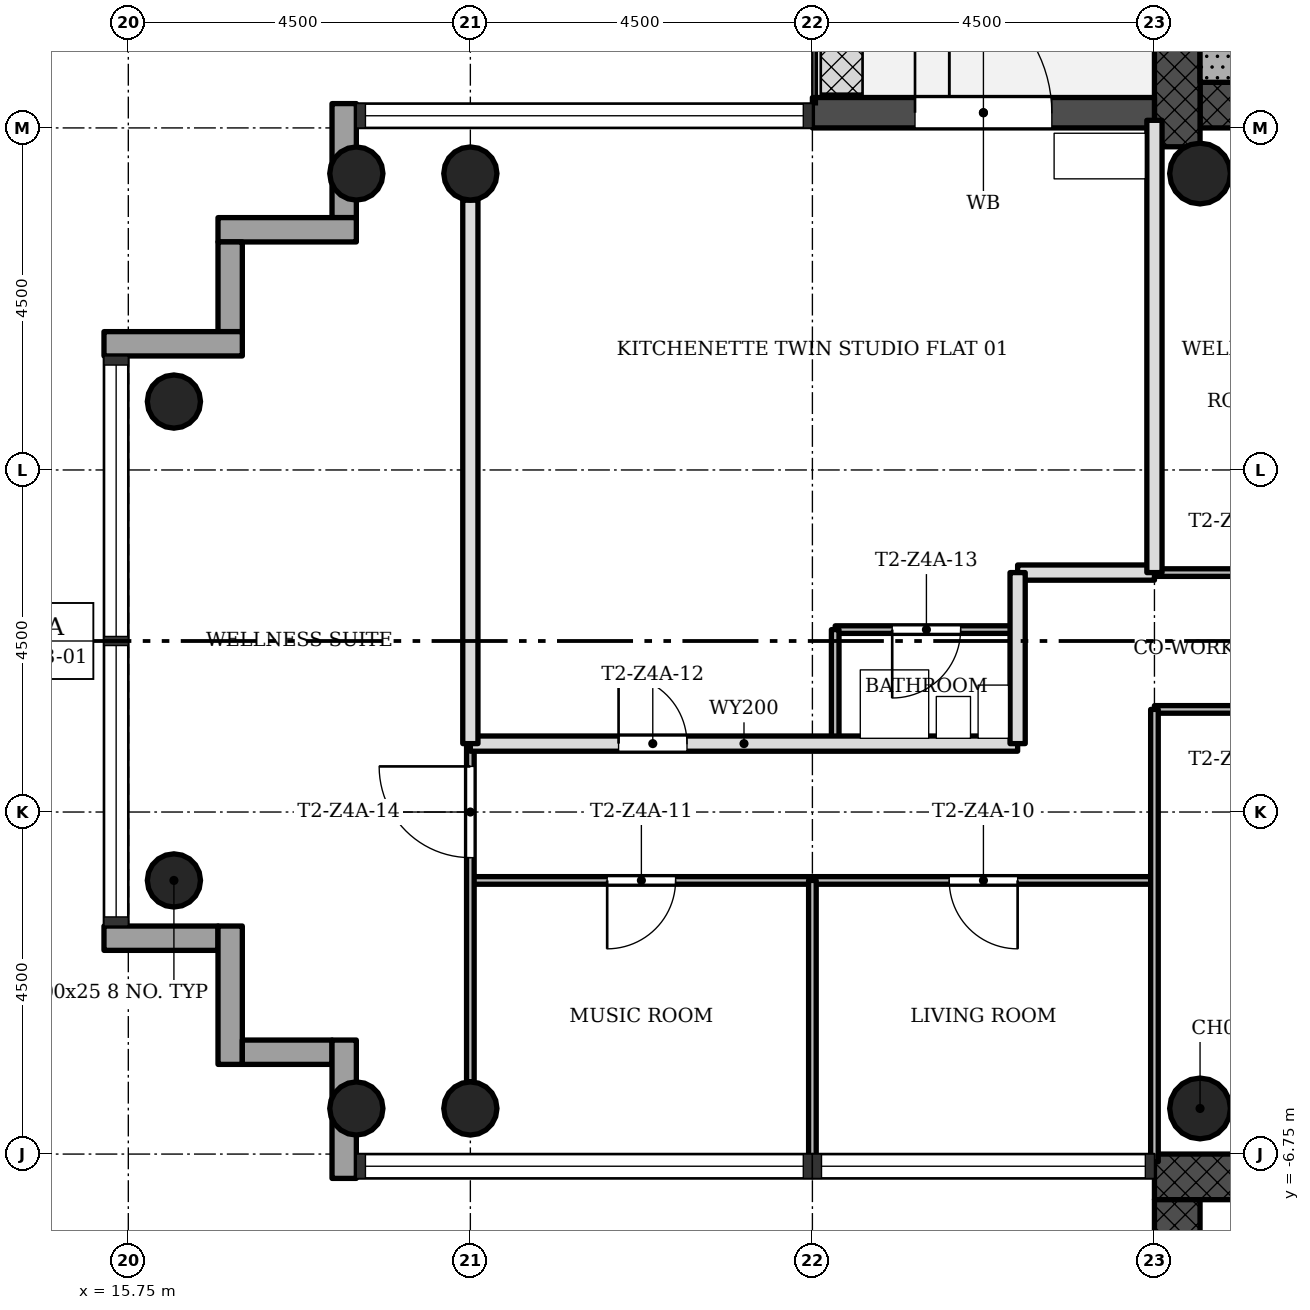
"""IFC4 building model, lengths in metres.
Left out: names, types, materials, properties, quantities, classifications, styles, units other than length and angle.
Written with IfcOpenShell. Run it as: python <this file> out.ifc"""

import sys

from ifc_helpers import new_model, si_unit, direction, frame, frame_2d, origin, origin_2d, place, context, subcontext, project, spatial, rectangle, hollow_circle, extrude, element, fill, save


model = new_model("IFC4")
c1 = context("Model", 3, precision=1e-05, world=origin(), true_north=direction((0.0, 1.0)))
c2 = subcontext(c1, "Body", "Model", "MODEL_VIEW")
j1 = project(units=[si_unit("LENGTHUNIT", "METRE"), si_unit("PLANEANGLEUNIT", "RADIAN")], contexts=[c1])
p1 = place(None, origin())
s1 = spatial("IfcSite", under=j1, at=p1, CompositionType="ELEMENT")
p2 = place(p1, origin())
s2 = spatial("IfcBuilding", under=s1, at=p2, CompositionType="ELEMENT")
p3 = place(p2, frame((0.0, 0.0, 226.6)))
s3 = spatial("IfcBuildingStorey", under=s2, at=p3, CompositionType="ELEMENT", Elevation=226.6)
p4 = place(p3, frame((29.85, 7.05, 0.0), z_axis=(0.0, 0.0, 1.0), x_axis=(1.0, 0.0, 0.0)))
e1 = element("IfcWall", 1, at=p4, inside=s3, PredefinedType="SHEAR", context=c2, shape_type="SweptSolid", body=[
    extrude(rectangle(XDim=12.9, YDim=0.6, at=frame_2d((6.45, 0.0))), origin(), (0.0, 0.0, 1.0), 3.4),
])
p5 = place(p4, frame((5.25, 0.0, 0.0)))
e2 = element("IfcOpeningElement", 2, at=p5, cuts=e1, PredefinedType="OPENING", context=c2, shape_type="SweptSolid", body=[
    extrude(rectangle(XDim=1.8, YDim=2.1, at=frame_2d((0.9, 1.05))), frame((0.0, 0.31, 0.0), z_axis=(0.0, -1.0, 0.0), x_axis=(1.0, 0.0, 0.0)), (0.0, 0.0, 1.0), 0.62),
])
p6 = place(p3, frame((29.55, 15.15, 0.0), z_axis=(0.0, 0.0, 1.0), x_axis=(0.0, -1.0, 0.0)))
e3 = element("IfcWall", 3, at=p6, inside=s3, PredefinedType="SHEAR", context=c2, shape_type="SweptSolid", body=[
    extrude(rectangle(XDim=8.648, YDim=0.6, at=frame_2d((4.324, 0.0))), origin(), (0.0, 0.0, 1.0), 3.4),
])
p7 = place(p3, frame((42.15, -7.05, 0.0), z_axis=(0.0, 0.0, 1.0), x_axis=(-1.0, 0.0, 0.0)))
e4 = element("IfcWall", 4, at=p7, inside=s3, PredefinedType="SHEAR", context=c2, shape_type="SweptSolid", body=[
    extrude(rectangle(XDim=12.9, YDim=0.6, at=frame_2d((6.45, 0.0))), origin(), (0.0, 0.0, 1.0), 3.4),
])
p8 = place(p7, frame((5.25, 0.0, 0.0)))
e5 = element("IfcOpeningElement", 5, at=p8, cuts=e4, PredefinedType="OPENING", context=c2, shape_type="SweptSolid", body=[
    extrude(rectangle(XDim=1.8, YDim=2.1, at=frame_2d((0.9, 1.05))), frame((0.0, 0.31, 0.0), z_axis=(0.0, -1.0, 0.0), x_axis=(1.0, 0.0, 0.0)), (0.0, 0.0, 1.0), 0.62),
])
p9 = place(p3, frame((29.55, -7.35, 0.0), z_axis=(0.0, 0.0, 1.0), x_axis=(0.0, -1.0, 0.0)))
e6 = element("IfcWall", 6, at=p9, inside=s3, PredefinedType="SHEAR", context=c2, shape_type="SweptSolid", body=[
    extrude(rectangle(XDim=8.4, YDim=0.6, at=frame_2d((4.2, 0.0))), origin(), (0.0, 0.0, 1.0), 3.4),
])
for number, where, z_axis, x_axis in (
    (7, (20.25, 6.15, 0.0), (0.0, 0.0, 1.0), (1.0, 0.0, 0.0)),
    (8, (20.25, -6.15, 0.0), (0.0, 0.0, 1.0), (1.0, 0.0, 0.0)),
    (9, (18.75, 6.15, 0.0), (0.0, 0.0, 1.0), (1.0, 0.0, 0.0)),
    (10, (18.75, -6.15, 0.0), (0.0, 0.0, 1.0), (1.0, 0.0, 0.0)),
    (11, (16.35, 3.15, 0.0), (0.0, 0.0, 1.0), (1.0, 0.0, 0.0)),
    (12, (16.35, -3.15, 0.0), (0.0, 0.0, 1.0), (1.0, 0.0, 0.0)),
):
    element("IfcColumn", number, at=place(p3, frame(where, z_axis=z_axis, x_axis=x_axis)), inside=s3, PredefinedType="COLUMN", context=c2, shape_type="SweptSolid", body=[
        extrude(hollow_circle(Radius=0.35, WallThickness=0.025, at=origin_2d()), origin(), (0.0, 0.0, 1.0), 3.4),
    ])
for number, where, z_axis, x_axis in (
    (13, (29.85, 6.15, 0.0), (0.0, 0.0, 1.0), (1.0, 0.0, 0.0)),
    (14, (29.85, -6.15, 0.0), (0.0, 0.0, 1.0), (1.0, 0.0, 0.0)),
):
    element("IfcColumn", number, at=place(p3, frame(where, z_axis=z_axis, x_axis=x_axis)), inside=s3, PredefinedType="COLUMN", context=c2, shape_type="SweptSolid", body=[
        extrude(hollow_circle(Radius=0.4, WallThickness=0.028, at=origin_2d()), origin(), (0.0, 0.0, 1.0), 3.4),
    ])
p10 = place(p3, frame((29.25, 6.95, -0.02), z_axis=(0.0, 0.0, 1.0), x_axis=(-1.0, 0.0, 0.0)))
e15 = element("IfcWall", 15, at=p10, inside=s3, PredefinedType="STANDARD", context=c2, shape_type="SweptSolid", body=[
    extrude(rectangle(XDim=4.5, YDim=0.4, at=frame_2d((2.25, 0.0))), origin(), (0.0, 0.0, 1.0), 3.12),
])
p11 = place(p10, frame((1.35, 0.0, 0.02)))
e16 = element("IfcOpeningElement", 16, at=p11, cuts=e15, PredefinedType="OPENING", context=c2, shape_type="SweptSolid", body=[
    extrude(rectangle(XDim=1.8, YDim=2.1, at=frame_2d((0.9, 1.05))), frame((0.0, 0.21, 0.0), z_axis=(0.0, -1.0, 0.0), x_axis=(1.0, 0.0, 0.0)), (0.0, 0.0, 1.0), 0.42),
])
p12 = place(p3, frame((18.59, 7.07, -0.3), z_axis=(0.0, 0.0, 1.0), x_axis=(0.0, -1.0, 0.0)))
e17 = element("IfcWall", 17, at=p12, inside=s3, PredefinedType="STANDARD", context=c2, shape_type="SweptSolid", body=[
    extrude(rectangle(XDim=1.5, YDim=0.32, at=frame_2d((0.75, 0.0))), origin(), (0.0, 0.0, 1.0), 3.4),
])
p13 = place(p3, frame((18.75, 5.41, -0.3), z_axis=(0.0, 0.0, 1.0), x_axis=(-1.0, 0.0, 0.0)))
e18 = element("IfcWall", 18, at=p13, inside=s3, PredefinedType="STANDARD", context=c2, shape_type="SweptSolid", body=[
    extrude(rectangle(XDim=1.82, YDim=0.32, at=frame_2d((0.91, 0.0))), origin(), (0.0, 0.0, 1.0), 3.4),
])
p14 = place(p3, frame((17.09, 5.25, -0.3), z_axis=(0.0, 0.0, 1.0), x_axis=(0.0, -1.0, 0.0)))
e19 = element("IfcWall", 19, at=p14, inside=s3, PredefinedType="STANDARD", context=c2, shape_type="SweptSolid", body=[
    extrude(rectangle(XDim=1.18, YDim=0.32, at=frame_2d((0.59, 0.0))), origin(), (0.0, 0.0, 1.0), 3.4),
])
p15 = place(p3, frame((17.25, 3.91, -0.3), z_axis=(0.0, 0.0, 1.0), x_axis=(-1.0, 0.0, 0.0)))
e20 = element("IfcWall", 20, at=p15, inside=s3, PredefinedType="STANDARD", context=c2, shape_type="SweptSolid", body=[
    extrude(rectangle(XDim=1.82, YDim=0.32, at=frame_2d((0.91, 0.0))), origin(), (0.0, 0.0, 1.0), 3.4),
])
p16 = place(p3, frame((15.43, -3.91, -0.3), z_axis=(0.0, 0.0, 1.0), x_axis=(1.0, 0.0, 0.0)))
e21 = element("IfcWall", 21, at=p16, inside=s3, PredefinedType="STANDARD", context=c2, shape_type="SweptSolid", body=[
    extrude(rectangle(XDim=1.5, YDim=0.32, at=frame_2d((0.75, 0.0))), origin(), (0.0, 0.0, 1.0), 3.4),
])
p17 = place(p3, frame((17.09, -3.75, -0.3), z_axis=(0.0, 0.0, 1.0), x_axis=(0.0, -1.0, 0.0)))
e22 = element("IfcWall", 22, at=p17, inside=s3, PredefinedType="STANDARD", context=c2, shape_type="SweptSolid", body=[
    extrude(rectangle(XDim=1.82, YDim=0.32, at=frame_2d((0.91, 0.0))), origin(), (0.0, 0.0, 1.0), 3.4),
])
p18 = place(p3, frame((17.25, -5.41, -0.3), z_axis=(0.0, 0.0, 1.0), x_axis=(1.0, 0.0, 0.0)))
e23 = element("IfcWall", 23, at=p18, inside=s3, PredefinedType="STANDARD", context=c2, shape_type="SweptSolid", body=[
    extrude(rectangle(XDim=1.18, YDim=0.32, at=frame_2d((0.59, 0.0))), origin(), (0.0, 0.0, 1.0), 3.4),
])
p19 = place(p3, frame((18.59, -5.25, -0.3), z_axis=(0.0, 0.0, 1.0), x_axis=(0.0, -1.0, 0.0)))
e24 = element("IfcWall", 24, at=p19, inside=s3, PredefinedType="STANDARD", context=c2, shape_type="SweptSolid", body=[
    extrude(rectangle(XDim=1.82, YDim=0.32, at=frame_2d((0.91, 0.0))), origin(), (0.0, 0.0, 1.0), 3.4),
])
p20 = place(p3, frame((29.25, -3.15, 0.0), z_axis=(0.0, 0.0, 1.0), x_axis=(-1.0, 0.0, 0.0)))
e25 = element("IfcWall", 25, at=p20, inside=s3, PredefinedType="PARTITIONING", context=c2, shape_type="SweptSolid", body=[
    extrude(rectangle(XDim=9.0, YDim=0.1, at=frame_2d((4.5, 0.0))), origin(), (0.0, 0.0, 1.0), 3.0),
])
p21 = place(p20, frame((1.8, 0.0, 0.0)))
e26 = element("IfcOpeningElement", 26, at=p21, cuts=e25, PredefinedType="OPENING", context=c2, shape_type="SweptSolid", body=[
    extrude(rectangle(XDim=0.9, YDim=2.1, at=frame_2d((0.45, 1.05))), frame((0.0, 0.06, 0.0), z_axis=(0.0, -1.0, 0.0), x_axis=(1.0, 0.0, 0.0)), (0.0, 0.0, 1.0), 0.12),
])
p22 = place(p20, frame((6.3, 0.0, 0.0)))
e27 = element("IfcOpeningElement", 27, at=p22, cuts=e25, PredefinedType="OPENING", context=c2, shape_type="SweptSolid", body=[
    extrude(rectangle(XDim=0.9, YDim=2.1, at=frame_2d((0.45, 1.05))), frame((0.0, 0.06, 0.0), z_axis=(0.0, -1.0, 0.0), x_axis=(1.0, 0.0, 0.0)), (0.0, 0.0, 1.0), 0.12),
])
p23 = place(p3, frame((27.45, -1.35, 0.0), z_axis=(0.0, 0.0, 1.0), x_axis=(-1.0, 0.0, 0.0)))
e28 = element("IfcWall", 28, at=p23, inside=s3, PredefinedType="SOLIDWALL", context=c2, shape_type="SweptSolid", body=[
    extrude(rectangle(XDim=7.2, YDim=0.2, at=frame_2d((3.6, 0.0))), origin(), (0.0, 0.0, 1.0), 3.0),
])
p24 = place(p23, frame((4.35, 0.0, 0.0)))
e29 = element("IfcOpeningElement", 29, at=p24, cuts=e28, PredefinedType="OPENING", context=c2, shape_type="SweptSolid", body=[
    extrude(rectangle(XDim=0.9, YDim=2.1, at=frame_2d((0.45, 1.05))), frame((0.0, 0.11, 0.0), z_axis=(0.0, -1.0, 0.0), x_axis=(1.0, 0.0, 0.0)), (0.0, 0.0, 1.0), 0.22),
])
p25 = place(p3, frame((31.5, -0.9, 0.0), z_axis=(0.0, 0.0, 1.0), x_axis=(-1.0, 0.0, 0.0)))
e30 = element("IfcWall", 30, at=p25, inside=s3, PredefinedType="PARTITIONING", context=c2, shape_type="SweptSolid", body=[
    extrude(rectangle(XDim=2.25, YDim=0.1, at=frame_2d((1.125, 0.0))), origin(), (0.0, 0.0, 1.0), 3.0),
])
p26 = place(p3, frame((27.45, 0.15, 0.0), z_axis=(0.0, 0.0, 1.0), x_axis=(-1.0, 0.0, 0.0)))
e31 = element("IfcWall", 31, at=p26, inside=s3, PredefinedType="PARTITIONING", context=c2, shape_type="SweptSolid", body=[
    extrude(rectangle(XDim=2.4, YDim=0.1, at=frame_2d((1.2, 0.0))), origin(), (0.0, 0.0, 1.0), 3.0),
])
p27 = place(p26, frame((0.75, 0.0, 0.0)))
e32 = element("IfcOpeningElement", 32, at=p27, cuts=e31, PredefinedType="OPENING", context=c2, shape_type="SweptSolid", body=[
    extrude(rectangle(XDim=0.9, YDim=2.1, at=frame_2d((0.45, 1.05))), frame((0.0, 0.06, 0.0), z_axis=(0.0, -1.0, 0.0), x_axis=(1.0, 0.0, 0.0)), (0.0, 0.0, 1.0), 0.12),
])
p28 = place(p3, frame((31.5, 0.9, 0.0), z_axis=(0.0, 0.0, 1.0), x_axis=(-1.0, 0.0, 0.0)))
e33 = element("IfcWall", 33, at=p28, inside=s3, PredefinedType="PARTITIONING", context=c2, shape_type="SweptSolid", body=[
    extrude(rectangle(XDim=2.25, YDim=0.1, at=frame_2d((1.125, 0.0))), origin(), (0.0, 0.0, 1.0), 3.0),
])
p29 = place(p3, frame((29.25, 0.9, 0.0), z_axis=(0.0, 0.0, 1.0), x_axis=(-1.0, 0.0, 0.0)))
e34 = element("IfcWall", 34, at=p29, inside=s3, PredefinedType="SOLIDWALL", context=c2, shape_type="SweptSolid", body=[
    extrude(rectangle(XDim=1.8, YDim=0.2, at=frame_2d((0.9, 0.0))), origin(), (0.0, 0.0, 1.0), 3.0),
])
p30 = place(p3, frame((29.25, -6.85, 0.0), z_axis=(0.0, 0.0, 1.0), x_axis=(0.0, 1.0, 0.0)))
e35 = element("IfcWall", 35, at=p30, inside=s3, PredefinedType="PARTITIONING", context=c2, shape_type="SweptSolid", body=[
    extrude(rectangle(XDim=5.95, YDim=0.1, at=frame_2d((2.975, 0.0))), origin(), (0.0, 0.0, 1.0), 3.0),
])
p31 = place(p3, frame((29.25, 0.9, 0.0), z_axis=(0.0, 0.0, 1.0), x_axis=(0.0, 1.0, 0.0)))
e36 = element("IfcWall", 36, at=p31, inside=s3, PredefinedType="SOLIDWALL", context=c2, shape_type="SweptSolid", body=[
    extrude(rectangle(XDim=5.95, YDim=0.2, at=frame_2d((2.975, 0.0))), origin(), (0.0, 0.0, 1.0), 3.0),
])
p32 = place(p3, frame((27.45, -1.35, 0.0), z_axis=(0.0, 0.0, 1.0), x_axis=(0.0, 1.0, 0.0)))
e37 = element("IfcWall", 37, at=p32, inside=s3, PredefinedType="SOLIDWALL", context=c2, shape_type="SweptSolid", body=[
    extrude(rectangle(XDim=2.25, YDim=0.2, at=frame_2d((1.125, 0.0))), origin(), (0.0, 0.0, 1.0), 3.0),
])
p33 = place(p3, frame((25.05, -1.35, 0.0), z_axis=(0.0, 0.0, 1.0), x_axis=(0.0, 1.0, 0.0)))
e38 = element("IfcWall", 38, at=p33, inside=s3, PredefinedType="PARTITIONING", context=c2, shape_type="SweptSolid", body=[
    extrude(rectangle(XDim=1.5, YDim=0.1, at=frame_2d((0.75, 0.0))), origin(), (0.0, 0.0, 1.0), 3.0),
])
p34 = place(p3, frame((24.75, -6.85, 0.0), z_axis=(0.0, 0.0, 1.0), x_axis=(0.0, 1.0, 0.0)))
e39 = element("IfcWall", 39, at=p34, inside=s3, PredefinedType="PARTITIONING", context=c2, shape_type="SweptSolid", body=[
    extrude(rectangle(XDim=3.7, YDim=0.1, at=frame_2d((1.85, 0.0))), origin(), (0.0, 0.0, 1.0), 3.0),
])
p35 = place(p3, frame((20.25, -5.8, 0.0), z_axis=(0.0, 0.0, 1.0), x_axis=(0.0, 1.0, 0.0)))
e40 = element("IfcWall", 40, at=p35, inside=s3, PredefinedType="PARTITIONING", context=c2, shape_type="SweptSolid", body=[
    extrude(rectangle(XDim=4.45, YDim=0.1, at=frame_2d((2.225, 0.0))), origin(), (0.0, 0.0, 1.0), 3.0),
])
p36 = place(p35, frame((2.95, 0.0, 0.0)))
e41 = element("IfcOpeningElement", 41, at=p36, cuts=e40, PredefinedType="OPENING", context=c2, shape_type="SweptSolid", body=[
    extrude(rectangle(XDim=1.2, YDim=2.1, at=frame_2d((0.6, 1.05))), frame((0.0, 0.06, 0.0), z_axis=(0.0, -1.0, 0.0), x_axis=(1.0, 0.0, 0.0)), (0.0, 0.0, 1.0), 0.12),
])
p37 = place(p3, frame((20.25, -1.35, 0.0), z_axis=(0.0, 0.0, 1.0), x_axis=(0.0, 1.0, 0.0)))
e42 = element("IfcWall", 42, at=p37, inside=s3, PredefinedType="SOLIDWALL", context=c2, shape_type="SweptSolid", body=[
    extrude(rectangle(XDim=7.15, YDim=0.2, at=frame_2d((3.575, 0.0))), origin(), (0.0, 0.0, 1.0), 3.0),
])
p38 = place(p3, frame((34.15, 7.65, 0.0), z_axis=(0.0, 0.0, 1.0), x_axis=(-1.0, 0.0, 0.0)))
e43 = element("IfcWall", 43, at=p38, inside=s3, PredefinedType="SHEAR", context=c2, shape_type="SweptSolid", body=[
    extrude(rectangle(XDim=4.3, YDim=0.6, at=frame_2d((2.15, 0.0))), origin(), (0.0, 0.0, 1.0), 3.4),
])
p39 = place(p11, origin())
e44 = element("IfcDoor", 44, at=p39, inside=s3, OperationType="SINGLE_SWING_RIGHT", PredefinedType="DOOR", context=c2, shape_type="SweptSolid", body=[
    extrude(rectangle(XDim=1.8, YDim=2.1, at=frame_2d((0.9, 1.05))), frame((0.0, 0.025, 0.0), z_axis=(0.0, -1.0, 0.0), x_axis=(1.0, 0.0, 0.0)), (0.0, 0.0, 1.0), 0.05),
])
fill(e16, e44)
p40 = place(p21, origin())
e45 = element("IfcDoor", 45, at=p40, inside=s3, OperationType="SINGLE_SWING_RIGHT", PredefinedType="DOOR", context=c2, shape_type="SweptSolid", body=[
    extrude(rectangle(XDim=0.9, YDim=2.1, at=frame_2d((0.45, 1.05))), frame((0.0, 0.025, 0.0), z_axis=(0.0, -1.0, 0.0), x_axis=(1.0, 0.0, 0.0)), (0.0, 0.0, 1.0), 0.05),
])
fill(e26, e45)
p41 = place(p22, origin())
e46 = element("IfcDoor", 46, at=p41, inside=s3, OperationType="SINGLE_SWING_LEFT", PredefinedType="DOOR", context=c2, shape_type="SweptSolid", body=[
    extrude(rectangle(XDim=0.9, YDim=2.1, at=frame_2d((0.45, 1.05))), frame((0.0, 0.025, 0.0), z_axis=(0.0, -1.0, 0.0), x_axis=(1.0, 0.0, 0.0)), (0.0, 0.0, 1.0), 0.05),
])
fill(e27, e46)
p42 = place(p24, origin())
e47 = element("IfcDoor", 47, at=p42, inside=s3, OperationType="SINGLE_SWING_RIGHT", PredefinedType="DOOR", context=c2, shape_type="SweptSolid", body=[
    extrude(rectangle(XDim=0.9, YDim=2.1, at=frame_2d((0.45, 1.05))), frame((0.0, 0.025, 0.0), z_axis=(0.0, -1.0, 0.0), x_axis=(1.0, 0.0, 0.0)), (0.0, 0.0, 1.0), 0.05),
])
fill(e29, e47)
p43 = place(p27, origin())
e48 = element("IfcDoor", 48, at=p43, inside=s3, OperationType="SINGLE_SWING_LEFT", PredefinedType="DOOR", context=c2, shape_type="SweptSolid", body=[
    extrude(rectangle(XDim=0.9, YDim=2.1, at=frame_2d((0.45, 1.05))), frame((0.0, 0.025, 0.0), z_axis=(0.0, -1.0, 0.0), x_axis=(1.0, 0.0, 0.0)), (0.0, 0.0, 1.0), 0.05),
])
fill(e32, e48)
p44 = place(p36, origin())
e49 = element("IfcDoor", 49, at=p44, inside=s3, OperationType="SINGLE_SWING_LEFT", PredefinedType="DOOR", context=c2, shape_type="SweptSolid", body=[
    extrude(rectangle(XDim=1.2, YDim=2.1, at=frame_2d((0.6, 1.05))), frame((0.0, 0.025, 0.0), z_axis=(0.0, -1.0, 0.0), x_axis=(1.0, 0.0, 0.0)), (0.0, 0.0, 1.0), 0.05),
])
fill(e41, e49)
save(model, sys.argv[1])
